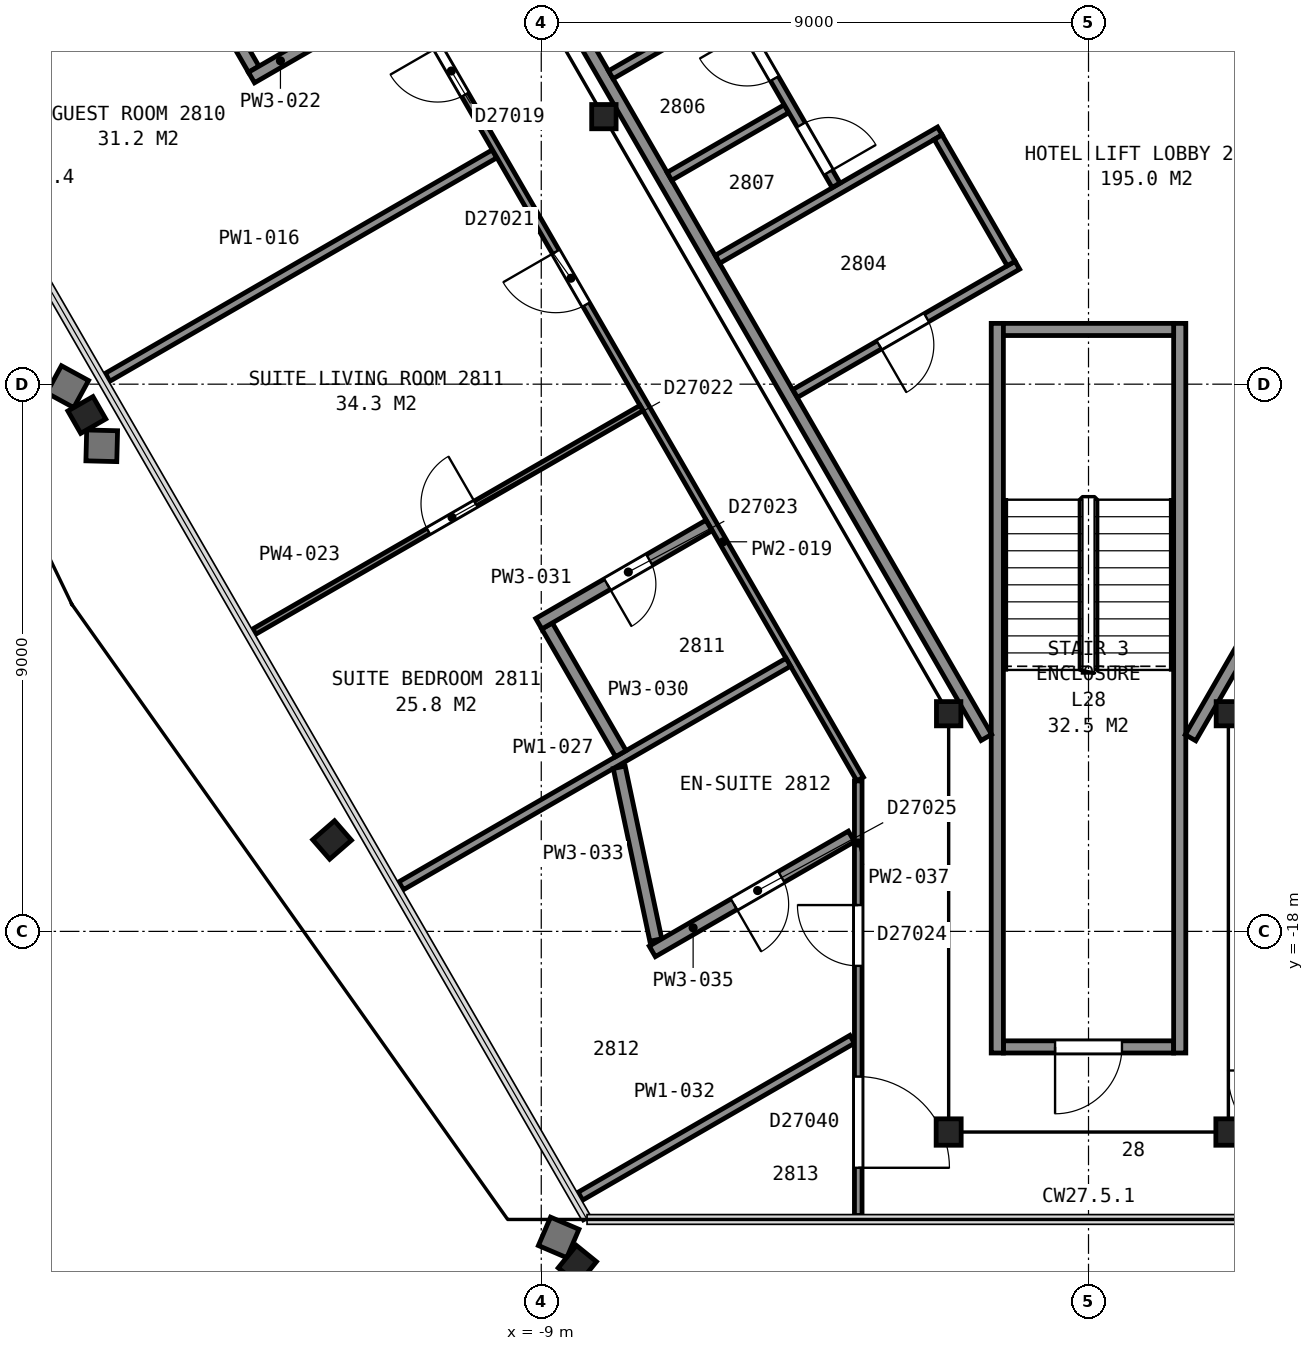
"""IFC4 building model, lengths in metres.
Left out: names, types, materials, properties, quantities, classifications, styles, units other than length and angle.
Written with IfcOpenShell. Run it as: python <this file> out.ifc"""

import sys

from ifc_helpers import new_model, si_unit, direction, frame, frame_2d, origin, origin_2d, place, context, subcontext, project, spatial, rectangle, i_section, extrude, element, fill, save


model = new_model("IFC4")
c1 = context("Model", 3, precision=1e-05, world=origin(), true_north=direction((0.0, 1.0)))
c2 = subcontext(c1, "Body", "Model", "MODEL_VIEW")
j1 = project(units=[si_unit("LENGTHUNIT", "METRE"), si_unit("PLANEANGLEUNIT", "RADIAN")], contexts=[c1])
p1 = place(None, origin())
s1 = spatial("IfcSite", under=j1, at=p1, CompositionType="ELEMENT")
p2 = place(p1, origin())
s2 = spatial("IfcBuilding", under=s1, at=p2, CompositionType="ELEMENT")
p3 = place(p2, frame((0.0, 0.0, 118.0)))
s3 = spatial("IfcBuildingStorey", under=s2, at=p3, CompositionType="ELEMENT", Elevation=118.0)
p4 = place(p3, frame((-16.276, -9.393, 0.035), z_axis=(-0.166300737804, -0.095436260144, 0.981445864455), x_axis=(-0.500069965347, 0.865984846123, -0.000525397431)))
e1 = element("IfcColumn", 1, at=p4, inside=s3, PredefinedType="COLUMN", context=c2, shape_type="SweptSolid", body=[
    extrude(i_section(OverallWidth=0.424, OverallDepth=0.475, WebThickness=0.048, FlangeThickness=0.077, FilletRadius=0.015, at=origin_2d()), origin(), (0.0, 0.0, 1.0), 3.597),
])
p5 = place(p3, frame((-12.266, -16.345, 0.04), z_axis=(-0.147073165168, -0.128025761723, 0.980805224508), x_axis=(-0.499695288695, 0.865366131575, 0.038027316234)))
e2 = element("IfcColumn", 2, at=p5, inside=s3, PredefinedType="COLUMN", context=c2, shape_type="SweptSolid", body=[
    extrude(i_section(OverallWidth=0.424, OverallDepth=0.475, WebThickness=0.048, FlangeThickness=0.077, FilletRadius=0.015, at=origin_2d()), origin(), (0.0, 0.0, 1.0), 3.589),
])
p6 = place(p3, frame((-8.256, -23.297, 0.045), z_axis=(-0.127835131108, -0.157801810749, 0.979161257291), x_axis=(-0.498757070895, 0.863572127983, 0.07405784228)))
e3 = element("IfcColumn", 3, at=p6, inside=s3, PredefinedType="COLUMN", context=c2, shape_type="SweptSolid", body=[
    extrude(i_section(OverallWidth=0.424, OverallDepth=0.475, WebThickness=0.048, FlangeThickness=0.077, FilletRadius=0.015, at=origin_2d()), origin(), (0.0, 0.0, 1.0), 3.585),
])
for number, where, z_axis, x_axis in (
    (4, (-7.97, -4.6, 0.0), (0.0, 0.0, 1.0), (1.0, 0.0, 0.0)),
    (5, (-2.3, -14.42, 0.0), (0.0, 0.0, 1.0), (1.0, 0.0, 0.0)),
):
    element("IfcColumn", number, at=place(p3, frame(where, z_axis=z_axis, x_axis=x_axis)), inside=s3, PredefinedType="COLUMN", context=c2, shape_type="SweptSolid", body=[
        extrude(i_section(OverallWidth=0.401, OverallDepth=0.399, WebThickness=0.025, FlangeThickness=0.04, FilletRadius=0.015, at=origin_2d()), origin(), (0.0, 0.0, 1.0), 3.6),
    ])
for number, where, z_axis, x_axis in (
    (6, (-2.3, -21.3, 0.0), (0.0, 0.0, 1.0), (-1.0, 0.0, 0.0)),
    (7, (2.3, -21.3, 0.0), (0.0, 0.0, 1.0), (-1.0, 0.0, 0.0)),
):
    element("IfcColumn", number, at=place(p3, frame(where, z_axis=z_axis, x_axis=x_axis)), inside=s3, PredefinedType="COLUMN", context=c2, shape_type="SweptSolid", body=[
        extrude(i_section(OverallWidth=0.411, OverallDepth=0.434, WebThickness=0.036, FlangeThickness=0.057, FilletRadius=0.015, at=origin_2d()), origin(), (0.0, 0.0, 1.0), 3.6),
    ])
p7 = place(p3, frame((2.3, -14.42, 0.0), z_axis=(0.0, 0.0, 1.0), x_axis=(1.0, 0.0, 0.0)))
e8 = element("IfcColumn", 8, at=p7, inside=s3, PredefinedType="COLUMN", context=c2, shape_type="SweptSolid", body=[
    extrude(i_section(OverallWidth=0.401, OverallDepth=0.399, WebThickness=0.025, FlangeThickness=0.04, FilletRadius=0.015, at=origin_2d()), origin(), (0.0, 0.0, 1.0), 3.6),
])
p8 = place(p3, frame((-1.4, -19.9, 0.0), z_axis=(0.0, 0.0, 1.0), x_axis=(1.0, 0.0, 0.0)))
e9 = element("IfcWall", 9, at=p8, inside=s3, PredefinedType="PARTITIONING", context=c2, shape_type="SweptSolid", body=[
    extrude(rectangle(XDim=2.8, YDim=0.2, at=frame_2d((1.4, 0.0))), origin(), (0.0, 0.0, 1.0), 3.35),
])
p9 = place(p8, frame((0.85, 0.0, 0.0)))
e10 = element("IfcOpeningElement", 10, at=p9, cuts=e9, PredefinedType="OPENING", context=c2, shape_type="SweptSolid", body=[
    extrude(rectangle(XDim=1.1, YDim=2.1, at=frame_2d((0.55, 1.05))), frame((0.0, 0.11, 0.0), z_axis=(0.0, -1.0, 0.0), x_axis=(1.0, 0.0, 0.0)), (0.0, 0.0, 1.0), 0.22),
])
for number, where, z_axis, x_axis in (
    (11, (1.5, -8.0, 0.0), (0.0, 0.0, 1.0), (0.0, -1.0, 0.0)),
    (12, (-1.5, -8.0, 0.0), (0.0, 0.0, 1.0), (0.0, -1.0, 0.0)),
):
    element("IfcWall", number, at=place(p3, frame(where, z_axis=z_axis, x_axis=x_axis)), inside=s3, PredefinedType="PARTITIONING", context=c2, shape_type="SweptSolid", body=[
        extrude(rectangle(XDim=12.0, YDim=0.2, at=frame_2d((6.0, 0.0))), origin(), (0.0, 0.0, 1.0), 3.35),
    ])
p10 = place(p3, frame((-1.4, -8.1, 0.0), z_axis=(0.0, 0.0, 1.0), x_axis=(1.0, 0.0, 0.0)))
e13 = element("IfcWall", 13, at=p10, inside=s3, PredefinedType="PARTITIONING", context=c2, shape_type="SweptSolid", body=[
    extrude(rectangle(XDim=2.8, YDim=0.2, at=frame_2d((1.4, 0.0))), origin(), (0.0, 0.0, 1.0), 3.35),
])
p11 = place(p3, frame((-13.664, 5.946, 0.0), z_axis=(0.0, 0.0, 1.0), x_axis=(0.499994327219, -0.866028678941, 0.0)))
e14 = element("IfcWall", 14, at=p11, inside=s3, PredefinedType="PARTITIONING", context=c2, shape_type="SweptSolid", body=[
    extrude(rectangle(XDim=23.968, YDim=0.2, at=frame_2d((11.984, 0.0))), origin(), (0.0, 0.0, 1.0), 3.35),
])
p12 = place(p3, frame((-7.856, -3.912, 0.0), z_axis=(0.0, 0.0, 1.0), x_axis=(0.865971748, 0.500092923031, 0.0)))
e15 = element("IfcWall", 15, at=p12, inside=s3, PredefinedType="PARTITIONING", context=c2, shape_type="SweptSolid", body=[
    extrude(rectangle(XDim=2.225, YDim=0.15, at=frame_2d((1.112, 0.0))), origin(), (0.0, 0.0, 1.0), 3.35),
])
p13 = place(p3, frame((-6.892, -5.582, 0.0), z_axis=(0.0, 0.0, 1.0), x_axis=(0.865944298464, 0.500140452231, 0.0)))
e16 = element("IfcWall", 16, at=p13, inside=s3, PredefinedType="PARTITIONING", context=c2, shape_type="SweptSolid", body=[
    extrude(rectangle(XDim=2.224, YDim=0.15, at=frame_2d((1.112, 0.0))), origin(), (0.0, 0.0, 1.0), 3.35),
])
p14 = place(p3, frame((-6.1, -6.946, 0.0), z_axis=(0.0, 0.0, 1.0), x_axis=(0.866038200431, 0.499977834903, 0.0)))
e17 = element("IfcWall", 17, at=p14, inside=s3, PredefinedType="PARTITIONING", context=c2, shape_type="SweptSolid", body=[
    extrude(rectangle(XDim=4.22, YDim=0.15, at=frame_2d((2.11, 0.0))), origin(), (0.0, 0.0, 1.0), 3.35),
])
p15 = place(p3, frame((-4.152, -5.729, 0.0), z_axis=(0.0, 0.0, 1.0), x_axis=(-0.500024287448, 0.866011380966, 0.0)))
e18 = element("IfcWall", 18, at=p15, inside=s3, PredefinedType="PARTITIONING", context=c2, shape_type="SweptSolid", body=[
    extrude(rectangle(XDim=3.501, YDim=0.15, at=frame_2d((1.75, 0.0))), origin(), (0.0, 0.0, 1.0), 3.35),
])
p16 = place(p15, frame((2.026, 0.0, 0.0)))
e19 = element("IfcOpeningElement", 19, at=p16, cuts=e18, PredefinedType="OPENING", context=c2, shape_type="SweptSolid", body=[
    extrude(rectangle(XDim=0.9, YDim=2.1, at=frame_2d((0.45, 1.05))), frame((0.0, 0.085, 0.0), z_axis=(0.0, -1.0, 0.0), x_axis=(1.0, 0.0, 0.0)), (0.0, 0.0, 1.0), 0.17),
])
p17 = place(p15, frame((0.248, 0.0, 0.0)))
e20 = element("IfcOpeningElement", 20, at=p17, cuts=e18, PredefinedType="OPENING", context=c2, shape_type="SweptSolid", body=[
    extrude(rectangle(XDim=0.9, YDim=2.1, at=frame_2d((0.45, 1.05))), frame((0.0, 0.085, 0.0), z_axis=(0.0, -1.0, 0.0), x_axis=(1.0, 0.0, 0.0)), (0.0, 0.0, 1.0), 0.17),
])
p18 = place(p3, frame((-4.825, -9.154, 0.0), z_axis=(0.0, 0.0, 1.0), x_axis=(0.866023738697, 0.500002884005, 0.0)))
e21 = element("IfcWall", 21, at=p18, inside=s3, PredefinedType="PARTITIONING", context=c2, shape_type="SweptSolid", body=[
    extrude(rectangle(XDim=4.22, YDim=0.15, at=frame_2d((2.11, 0.0))), origin(), (0.0, 0.0, 1.0), 3.35),
])
p19 = place(p18, frame((1.595, 0.0, 0.0)))
e22 = element("IfcOpeningElement", 22, at=p19, cuts=e21, PredefinedType="OPENING", context=c2, shape_type="SweptSolid", body=[
    extrude(rectangle(XDim=0.9, YDim=2.1, at=frame_2d((0.45, 1.05))), frame((0.0, 0.085, 0.0), z_axis=(0.0, -1.0, 0.0), x_axis=(1.0, 0.0, 0.0)), (0.0, 0.0, 1.0), 0.17),
])
p20 = place(p3, frame((-2.472, -4.938, 0.0), z_axis=(0.0, 0.0, 1.0), x_axis=(0.500045362686, -0.865999212041, 0.0)))
e23 = element("IfcWall", 23, at=p20, inside=s3, PredefinedType="PARTITIONING", context=c2, shape_type="SweptSolid", body=[
    extrude(rectangle(XDim=2.4, YDim=0.15, at=frame_2d((1.2, 0.0))), origin(), (0.0, 0.0, 1.0), 3.35),
])
p21 = place(p3, frame((1.677, -14.815, 0.0), z_axis=(0.0, 0.0, 1.0), x_axis=(0.49999445743, 0.866028603765, 0.0)))
e24 = element("IfcWall", 24, at=p21, inside=s3, PredefinedType="PARTITIONING", context=c2, shape_type="SweptSolid", body=[
    extrude(rectangle(XDim=5.905, YDim=0.2, at=frame_2d((2.952, 0.0))), origin(), (0.0, 0.0, 1.0), 3.35),
])
p22 = place(p21, frame((3.855, 0.0, 0.0)))
e25 = element("IfcOpeningElement", 25, at=p22, cuts=e24, PredefinedType="OPENING", context=c2, shape_type="SweptSolid", body=[
    extrude(rectangle(XDim=1.8, YDim=2.1, at=frame_2d((0.9, 1.05))), frame((0.0, 0.11, 0.0), z_axis=(0.0, -1.0, 0.0), x_axis=(1.0, 0.0, 0.0)), (0.0, 0.0, 1.0), 0.22),
])
p23 = place(p3, frame((-18.775, -4.31, 0.0), z_axis=(0.0, 0.0, 1.0), x_axis=(0.866003534372, 0.50003787702, 0.0)))
e26 = element("IfcWall", 26, at=p23, inside=s3, PredefinedType="PARTITIONING", context=c2, shape_type="SweptSolid", body=[
    extrude(rectangle(XDim=7.348, YDim=0.15, at=frame_2d((3.674, 0.0))), origin(), (0.0, 0.0, 1.0), 2.613),
])
p24 = place(p3, frame((-16.133, -8.887, 0.0), z_axis=(0.0, 0.0, 1.0), x_axis=(0.865997454095, 0.500048407157, 0.0)))
e27 = element("IfcWall", 27, at=p24, inside=s3, PredefinedType="PARTITIONING", context=c2, shape_type="SweptSolid", body=[
    extrude(rectangle(XDim=7.348, YDim=0.15, at=frame_2d((3.674, 0.0))), origin(), (0.0, 0.0, 1.0), 2.613),
])
p25 = place(p3, frame((-3.756, -15.494, 0.0), z_axis=(0.0, 0.0, 1.0), x_axis=(-0.500027787016, 0.866009360349, 0.0)))
e28 = element("IfcWall", 28, at=p25, inside=s3, PredefinedType="PARTITIONING", context=c2, shape_type="SweptSolid", body=[
    extrude(rectangle(XDim=23.856, YDim=0.125, at=frame_2d((11.928, 0.0))), origin(), (0.0, 0.0, 1.0), 2.613),
])
p26 = place(p25, frame((22.393, 0.0, 0.0)))
e29 = element("IfcOpeningElement", 29, at=p26, cuts=e28, PredefinedType="OPENING", context=c2, shape_type="SweptSolid", body=[
    extrude(rectangle(XDim=1.0, YDim=2.1, at=frame_2d((0.5, 1.05))), frame((0.0, 0.073, 0.0), z_axis=(0.0, -1.0, 0.0), x_axis=(1.0, 0.0, 0.0)), (0.0, 0.0, 1.0), 0.145),
])
p27 = place(p25, frame((12.996, 0.0, 0.0)))
e30 = element("IfcOpeningElement", 30, at=p27, cuts=e28, PredefinedType="OPENING", context=c2, shape_type="SweptSolid", body=[
    extrude(rectangle(XDim=0.9, YDim=2.1, at=frame_2d((0.45, 1.05))), frame((0.0, 0.073, 0.0), z_axis=(0.0, -1.0, 0.0), x_axis=(1.0, 0.0, 0.0)), (0.0, 0.0, 1.0), 0.145),
])
p28 = place(p25, frame((9.011, 0.0, 0.0)))
e31 = element("IfcOpeningElement", 31, at=p28, cuts=e28, PredefinedType="OPENING", context=c2, shape_type="SweptSolid", body=[
    extrude(rectangle(XDim=1.0, YDim=2.1, at=frame_2d((0.5, 1.05))), frame((0.0, 0.073, 0.0), z_axis=(0.0, -1.0, 0.0), x_axis=(1.0, 0.0, 0.0)), (0.0, 0.0, 1.0), 0.145),
])
p29 = place(p3, frame((-14.739, -2.071, 0.0), z_axis=(0.0, 0.0, 1.0), x_axis=(0.500078207394, -0.865980246016, 0.0)))
e32 = element("IfcWall", 32, at=p29, inside=s3, PredefinedType="PARTITIONING", context=c2, shape_type="SweptSolid", body=[
    extrude(rectangle(XDim=2.02, YDim=0.2, at=frame_2d((1.01, 0.0))), origin(), (0.0, 0.0, 1.0), 2.613),
])
p30 = place(p3, frame((-13.766, -3.957, 0.0), z_axis=(0.0, 0.0, 1.0), x_axis=(0.866033446572, 0.499986069224, 0.0)))
e33 = element("IfcWall", 33, at=p30, inside=s3, PredefinedType="PARTITIONING", context=c2, shape_type="SweptSolid", body=[
    extrude(rectangle(XDim=2.833, YDim=0.2, at=frame_2d((1.416, 0.0))), origin(), (0.0, 0.0, 1.0), 2.613),
])
p31 = place(p30, frame((1.1, 0.0, 0.0)))
e34 = element("IfcOpeningElement", 34, at=p31, cuts=e33, PredefinedType="OPENING", context=c2, shape_type="SweptSolid", body=[
    extrude(rectangle(XDim=0.8, YDim=2.1, at=frame_2d((0.4, 1.05))), frame((0.0, 0.11, 0.0), z_axis=(0.0, -1.0, 0.0), x_axis=(1.0, 0.0, 0.0)), (0.0, 0.0, 1.0), 0.22),
])
p32 = place(p3, frame((-7.351, -9.392, 0.0), z_axis=(0.0, 0.0, 1.0), x_axis=(-0.8660606245, -0.499938990969, 0.0)))
e35 = element("IfcWall", 35, at=p32, inside=s3, PredefinedType="PARTITIONING", context=c2, shape_type="SweptSolid", body=[
    extrude(rectangle(XDim=7.353, YDim=0.1, at=frame_2d((3.676, 0.0))), origin(), (0.0, 0.0, 1.0), 2.613),
])
p33 = place(p32, frame((3.148, 0.0, 0.0)))
e36 = element("IfcOpeningElement", 36, at=p33, cuts=e35, PredefinedType="OPENING", context=c2, shape_type="SweptSolid", body=[
    extrude(rectangle(XDim=0.9, YDim=2.1, at=frame_2d((0.45, 1.05))), frame((0.0, 0.06, 0.0), z_axis=(0.0, -1.0, 0.0), x_axis=(1.0, 0.0, 0.0)), (0.0, 0.0, 1.0), 0.12),
])
p34 = place(p3, frame((-11.304, -17.25, 0.0), z_axis=(0.0, 0.0, 1.0), x_axis=(0.86600919026, 0.500028081597, 0.0)))
e37 = element("IfcWall", 37, at=p34, inside=s3, PredefinedType="PARTITIONING", context=c2, shape_type="SweptSolid", body=[
    extrude(rectangle(XDim=7.353, YDim=0.15, at=frame_2d((3.676, 0.0))), origin(), (0.0, 0.0, 1.0), 2.613),
])
p35 = place(p3, frame((-8.904, -12.977, 0.0), z_axis=(0.0, 0.0, 1.0), x_axis=(0.499960613912, -0.866048142159, 0.0)))
e38 = element("IfcWall", 38, at=p35, inside=s3, PredefinedType="PARTITIONING", context=c2, shape_type="SweptSolid", body=[
    extrude(rectangle(XDim=2.426, YDim=0.2, at=frame_2d((1.213, 0.0))), origin(), (0.0, 0.0, 1.0), 2.613),
])
p36 = place(p3, frame((-6.241, -11.324, 0.0), z_axis=(0.0, 0.0, 1.0), x_axis=(-0.866003189247, -0.500038474733, 0.0)))
e39 = element("IfcWall", 39, at=p36, inside=s3, PredefinedType="PARTITIONING", context=c2, shape_type="SweptSolid", body=[
    extrude(rectangle(XDim=3.232, YDim=0.2, at=frame_2d((1.616, 0.0))), origin(), (0.0, 0.0, 1.0), 2.613),
])
p37 = place(p36, frame((1.132, 0.0, 0.0)))
e40 = element("IfcOpeningElement", 40, at=p37, cuts=e39, PredefinedType="OPENING", context=c2, shape_type="SweptSolid", body=[
    extrude(rectangle(XDim=0.8, YDim=2.1, at=frame_2d((0.4, 1.05))), frame((0.0, 0.11, 0.0), z_axis=(0.0, -1.0, 0.0), x_axis=(1.0, 0.0, 0.0)), (0.0, 0.0, 1.0), 0.22),
])
p38 = place(p3, frame((-8.357, -22.355, 0.0), z_axis=(0.0, 0.0, 1.0), x_axis=(0.866060346521, 0.499939472521, 0.0)))
e41 = element("IfcWall", 41, at=p38, inside=s3, PredefinedType="PARTITIONING", context=c2, shape_type="SweptSolid", body=[
    extrude(rectangle(XDim=5.161, YDim=0.15, at=frame_2d((2.581, 0.0))), origin(), (0.0, 0.0, 1.0), 2.613),
])
p39 = place(p3, frame((-7.718, -15.301, 0.0), z_axis=(0.0, 0.0, 1.0), x_axis=(0.207306745071, -0.978275990428, 0.0)))
e42 = element("IfcWall", 42, at=p39, inside=s3, PredefinedType="PARTITIONING", context=c2, shape_type="SweptSolid", body=[
    extrude(rectangle(XDim=2.904, YDim=0.2, at=frame_2d((1.452, 0.0))), origin(), (0.0, 0.0, 1.0), 2.613),
])
p40 = place(p3, frame((-7.174, -18.329, 0.0), z_axis=(0.0, 0.0, 1.0), x_axis=(0.865937163705, 0.500152805165, 0.0)))
e43 = element("IfcWall", 43, at=p40, inside=s3, PredefinedType="PARTITIONING", context=c2, shape_type="SweptSolid", body=[
    extrude(rectangle(XDim=3.781, YDim=0.2, at=frame_2d((1.891, 0.0))), origin(), (0.0, 0.0, 1.0), 2.613),
])
p41 = place(p40, frame((1.55, 0.0, 0.0)))
e44 = element("IfcOpeningElement", 44, at=p41, cuts=e43, PredefinedType="OPENING", context=c2, shape_type="SweptSolid", body=[
    extrude(rectangle(XDim=0.9, YDim=2.1, at=frame_2d((0.45, 1.05))), frame((0.0, 0.11, 0.0), z_axis=(0.0, -1.0, 0.0), x_axis=(1.0, 0.0, 0.0)), (0.0, 0.0, 1.0), 0.22),
])
p42 = place(p3, frame((-3.787, -22.673, 0.0), z_axis=(0.0, 0.0, 1.0), x_axis=(0.0, 1.0, 0.0)))
e45 = element("IfcWall", 45, at=p42, inside=s3, PredefinedType="PARTITIONING", context=c2, shape_type="SweptSolid", body=[
    extrude(rectangle(XDim=7.148, YDim=0.125, at=frame_2d((3.574, 0.0))), origin(), (0.0, 0.0, 1.0), 2.613),
])
p43 = place(p42, frame((4.106, 0.0, 0.0)))
e46 = element("IfcOpeningElement", 46, at=p43, cuts=e45, PredefinedType="OPENING", context=c2, shape_type="SweptSolid", body=[
    extrude(rectangle(XDim=1.0, YDim=2.1, at=frame_2d((0.5, 1.05))), frame((0.0, 0.073, 0.0), z_axis=(0.0, -1.0, 0.0), x_axis=(1.0, 0.0, 0.0)), (0.0, 0.0, 1.0), 0.145),
])
p44 = place(p42, frame((0.785, 0.0, 0.0)))
e47 = element("IfcOpeningElement", 47, at=p44, cuts=e45, PredefinedType="OPENING", context=c2, shape_type="SweptSolid", body=[
    extrude(rectangle(XDim=1.5, YDim=2.1, at=frame_2d((0.75, 1.05))), frame((0.0, 0.073, 0.0), z_axis=(0.0, -1.0, 0.0), x_axis=(1.0, 0.0, 0.0)), (0.0, 0.0, 1.0), 0.145),
])
p45 = place(p9, origin())
e48 = element("IfcDoor", 48, at=p45, inside=s3, OperationType="SINGLE_SWING_LEFT", PredefinedType="DOOR", context=c2, shape_type="SweptSolid", body=[
    extrude(rectangle(XDim=1.1, YDim=2.1, at=frame_2d((0.55, 1.05))), frame((0.0, 0.025, 0.0), z_axis=(0.0, -1.0, 0.0), x_axis=(1.0, 0.0, 0.0)), (0.0, 0.0, 1.0), 0.05),
])
fill(e10, e48)
p46 = place(p16, origin())
e49 = element("IfcDoor", 49, at=p46, inside=s3, OperationType="SINGLE_SWING_RIGHT", PredefinedType="DOOR", context=c2, shape_type="SweptSolid", body=[
    extrude(rectangle(XDim=0.9, YDim=2.1, at=frame_2d((0.45, 1.05))), frame((0.0, 0.025, 0.0), z_axis=(0.0, -1.0, 0.0), x_axis=(1.0, 0.0, 0.0)), (0.0, 0.0, 1.0), 0.05),
])
fill(e19, e49)
p47 = place(p17, origin())
e50 = element("IfcDoor", 50, at=p47, inside=s3, OperationType="SINGLE_SWING_LEFT", PredefinedType="DOOR", context=c2, shape_type="SweptSolid", body=[
    extrude(rectangle(XDim=0.9, YDim=2.1, at=frame_2d((0.45, 1.05))), frame((0.0, 0.025, 0.0), z_axis=(0.0, -1.0, 0.0), x_axis=(1.0, 0.0, 0.0)), (0.0, 0.0, 1.0), 0.05),
])
fill(e20, e50)
p48 = place(p19, origin())
e51 = element("IfcDoor", 51, at=p48, inside=s3, OperationType="SINGLE_SWING_LEFT", PredefinedType="DOOR", context=c2, shape_type="SweptSolid", body=[
    extrude(rectangle(XDim=0.9, YDim=2.1, at=frame_2d((0.45, 1.05))), frame((0.0, 0.025, 0.0), z_axis=(0.0, -1.0, 0.0), x_axis=(1.0, 0.0, 0.0)), (0.0, 0.0, 1.0), 0.05),
])
fill(e22, e51)
p49 = place(p27, origin())
e52 = element("IfcDoor", 52, at=p49, inside=s3, OperationType="SINGLE_SWING_RIGHT", PredefinedType="DOOR", context=c2, shape_type="SweptSolid", body=[
    extrude(rectangle(XDim=0.9, YDim=2.1, at=frame_2d((0.45, 1.05))), frame((0.0, 0.025, 0.0), z_axis=(0.0, -1.0, 0.0), x_axis=(1.0, 0.0, 0.0)), (0.0, 0.0, 1.0), 0.05),
])
fill(e30, e52)
p50 = place(p28, origin())
e53 = element("IfcDoor", 53, at=p50, inside=s3, OperationType="SINGLE_SWING_RIGHT", PredefinedType="DOOR", context=c2, shape_type="SweptSolid", body=[
    extrude(rectangle(XDim=1.0, YDim=2.1, at=frame_2d((0.5, 1.05))), frame((0.0, 0.025, 0.0), z_axis=(0.0, -1.0, 0.0), x_axis=(1.0, 0.0, 0.0)), (0.0, 0.0, 1.0), 0.05),
])
fill(e31, e53)
p51 = place(p33, origin())
e54 = element("IfcDoor", 54, at=p51, inside=s3, OperationType="SINGLE_SWING_LEFT", PredefinedType="DOOR", context=c2, shape_type="SweptSolid", body=[
    extrude(rectangle(XDim=0.9, YDim=2.1, at=frame_2d((0.45, 1.05))), frame((0.0, 0.025, 0.0), z_axis=(0.0, -1.0, 0.0), x_axis=(1.0, 0.0, 0.0)), (0.0, 0.0, 1.0), 0.05),
])
fill(e36, e54)
p52 = place(p37, origin())
e55 = element("IfcDoor", 55, at=p52, inside=s3, OperationType="SINGLE_SWING_RIGHT", PredefinedType="DOOR", context=c2, shape_type="SweptSolid", body=[
    extrude(rectangle(XDim=0.8, YDim=2.1, at=frame_2d((0.4, 1.05))), frame((0.0, 0.025, 0.0), z_axis=(0.0, -1.0, 0.0), x_axis=(1.0, 0.0, 0.0)), (0.0, 0.0, 1.0), 0.05),
])
fill(e40, e55)
p53 = place(p41, origin())
e56 = element("IfcDoor", 56, at=p53, inside=s3, OperationType="SINGLE_SWING_LEFT", PredefinedType="DOOR", context=c2, shape_type="SweptSolid", body=[
    extrude(rectangle(XDim=0.9, YDim=2.1, at=frame_2d((0.45, 1.05))), frame((0.0, 0.025, 0.0), z_axis=(0.0, -1.0, 0.0), x_axis=(1.0, 0.0, 0.0)), (0.0, 0.0, 1.0), 0.05),
])
fill(e44, e56)
p54 = place(p43, origin())
e57 = element("IfcDoor", 57, at=p54, inside=s3, OperationType="SINGLE_SWING_RIGHT", PredefinedType="DOOR", context=c2, shape_type="SweptSolid", body=[
    extrude(rectangle(XDim=1.0, YDim=2.1, at=frame_2d((0.5, 1.05))), frame((0.0, 0.025, 0.0), z_axis=(0.0, -1.0, 0.0), x_axis=(1.0, 0.0, 0.0)), (0.0, 0.0, 1.0), 0.05),
])
fill(e46, e57)
p55 = place(p44, origin())
e58 = element("IfcDoor", 58, at=p55, inside=s3, OperationType="DOUBLE_DOOR_SINGLE_SWING", PredefinedType="DOOR", context=c2, shape_type="SweptSolid", body=[
    extrude(rectangle(XDim=1.5, YDim=2.1, at=frame_2d((0.75, 1.05))), frame((0.0, 0.025, 0.0), z_axis=(0.0, -1.0, 0.0), x_axis=(1.0, 0.0, 0.0)), (0.0, 0.0, 1.0), 0.05),
])
fill(e47, e58)
save(model, sys.argv[1])
